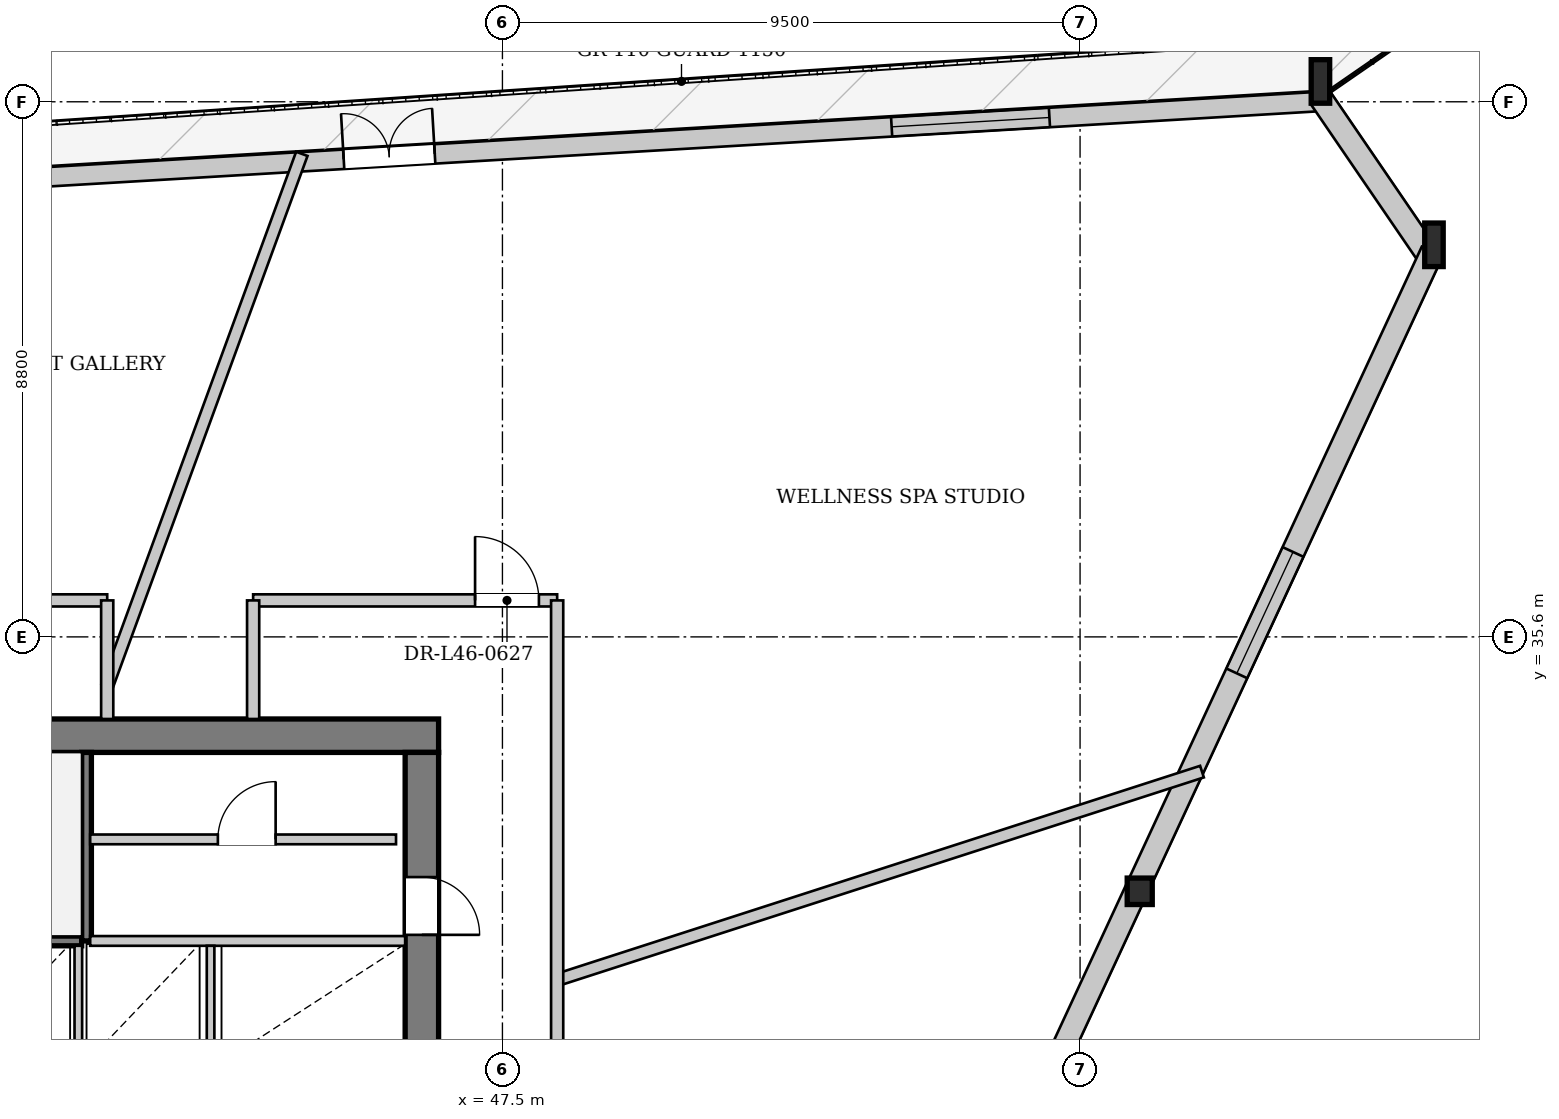
"""IFC4 building model, lengths in metres.
Left out: names, types, materials, properties, quantities, classifications, styles, units other than length and angle.
Written with IfcOpenShell. Run it as: python <this file> out.ifc"""

import sys

from ifc_helpers import new_model, si_unit, direction, frame, frame_2d, origin, origin_2d, place, context, subcontext, project, spatial, rectangle, i_section, extrude, source, transform, mapped, element, fill, save


model = new_model("IFC4")
c1 = context("Model", 3, precision=1e-05, world=origin(), true_north=direction((0.0, 1.0)))
c2 = subcontext(c1, "Body", "Model", "MODEL_VIEW")
j1 = project(units=[si_unit("LENGTHUNIT", "METRE"), si_unit("PLANEANGLEUNIT", "RADIAN")], contexts=[c1])
p1 = place(None, origin())
s1 = spatial("IfcSite", under=j1, at=p1, CompositionType="ELEMENT")
p2 = place(p1, origin())
s2 = spatial("IfcBuilding", under=s1, at=p2, CompositionType="ELEMENT")
p3 = place(p2, frame((0.0, 0.0, 175.0)))
s3 = spatial("IfcBuildingStorey", under=s2, at=p3, CompositionType="ELEMENT", Elevation=175.0)
m1 = source(origin(), c2, "Body", "SweptSolid", [
    extrude(i_section(OverallWidth=0.304, OverallDepth=0.716, WebThickness=0.021, FlangeThickness=0.04, at=origin_2d()), origin(), (0.0, 0.0, 1.0), 3.419),
])
p4 = place(p3, frame((62.965, 41.858, 0.0), z_axis=(-0.084770266096, 0.111194022166, 0.99017669707), x_axis=(-0.795255814538, -0.606274021745, 0.0)))
e1 = element("IfcColumn", 1, at=p4, inside=s3, PredefinedType="COLUMN", context=c2, shape_type="MappedRepresentation", body=[
    mapped(m1, transform((0.0, 0.0, 0.0), x_axis=(1.0, 0.0, 0.0), y_axis=(0.0, 1.0, 0.0), z_axis=(0.0, 0.0, 1.0), scale=1.0)),
])
m2 = source(origin(), c2, "Body", "SweptSolid", [
    extrude(i_section(OverallWidth=0.304, OverallDepth=0.716, WebThickness=0.021, FlangeThickness=0.04, at=origin_2d()), origin(), (0.0, 0.0, 1.0), 3.414),
])
p5 = place(p3, frame((61.108, 44.575, 0.0), z_axis=(-0.090815817795, 0.093533141477, 0.991465601362), x_axis=(-0.717451675524, -0.696608278223, 0.0)))
e2 = element("IfcColumn", 2, at=p5, inside=s3, PredefinedType="COLUMN", context=c2, shape_type="MappedRepresentation", body=[
    mapped(m2, transform((0.0, 0.0, 0.0), x_axis=(1.0, 0.0, 0.0), y_axis=(0.0, 1.0, 0.0), z_axis=(0.0, 0.0, 1.0), scale=1.0)),
])
m3 = source(origin(), c2, "Body", "SweptSolid", [
    extrude(i_section(OverallWidth=0.412, OverallDepth=0.435, WebThickness=0.031, FlangeThickness=0.05, at=origin_2d()), origin(), (0.0, 0.0, 1.0), 3.404),
])
p6 = place(p3, frame((58.05, 31.252, 0.0), z_axis=(-0.0404553248, 0.096332448948, 0.994526734671), x_axis=(-0.92199681109, -0.387197469438, 0.0)))
e3 = element("IfcColumn", 3, at=p6, inside=s3, PredefinedType="COLUMN", context=c2, shape_type="MappedRepresentation", body=[
    mapped(m3, transform((0.0, 0.0, 0.0), x_axis=(1.0, 0.0, 0.0), y_axis=(0.0, 1.0, 0.0), z_axis=(0.0, 0.0, 1.0), scale=1.0)),
])
p7 = place(p3, frame((38.354, 43.067, 0.0), z_axis=(0.0, 0.0, 1.0), x_axis=(0.998252151259, 0.059098582957, 0.0)))
e4 = element("IfcWall", 4, at=p7, inside=s3, PredefinedType="SOLIDWALL", context=c2, shape_type="SweptSolid", body=[
    extrude(rectangle(XDim=22.803, YDim=0.32, at=frame_2d((11.402, 0.0))), origin(), (0.0, 0.0, 1.0), 2.722),
])
p8 = place(p7, frame((6.547, 0.0, 0.0)))
e5 = element("IfcOpeningElement", 5, at=p8, cuts=e4, PredefinedType="OPENING", context=c2, shape_type="SweptSolid", body=[
    extrude(rectangle(XDim=1.5, YDim=2.3, at=frame_2d((0.75, 1.15))), frame((0.0, 0.17, 0.0), z_axis=(0.0, -1.0, 0.0), x_axis=(1.0, 0.0, 0.0)), (0.0, 0.0, 1.0), 0.34),
])
p9 = place(p7, frame((15.574, 0.0, 0.252)))
e6 = element("IfcOpeningElement", 6, at=p9, cuts=e4, PredefinedType="OPENING", context=c2, shape_type="SweptSolid", body=[
    extrude(rectangle(XDim=2.6, YDim=2.35, at=frame_2d((1.3, 1.175))), frame((0.0, 0.17, 0.0), z_axis=(0.0, -1.0, 0.0), x_axis=(1.0, 0.0, 0.0)), (0.0, 0.0, 1.0), 0.34),
])
p10 = place(p3, frame((60.951, 44.468, 0.0), z_axis=(0.0, 0.0, 1.0), x_axis=(0.564284906386, -0.825580125987, 0.0)))
e7 = element("IfcWall", 7, at=p10, inside=s3, PredefinedType="SOLIDWALL", context=c2, shape_type="SweptSolid", body=[
    extrude(rectangle(XDim=3.291, YDim=0.38, at=frame_2d((1.646, 0.0))), origin(), (0.0, 0.0, 1.0), 2.722),
])
p11 = place(p3, frame((62.792, 41.938, 0.0), z_axis=(0.0, 0.0, 1.0), x_axis=(-0.420482819505, -0.907300500662, 0.0)))
e8 = element("IfcWall", 8, at=p11, inside=s3, PredefinedType="SOLIDWALL", context=c2, shape_type="SweptSolid", body=[
    extrude(rectangle(XDim=23.378, YDim=0.38, at=frame_2d((11.689, 0.0))), origin(), (0.0, 0.0, 1.0), 2.722),
])
p12 = place(p11, frame((5.446, 0.0, 0.352)))
e9 = element("IfcOpeningElement", 9, at=p12, cuts=e8, PredefinedType="OPENING", context=c2, shape_type="SweptSolid", body=[
    extrude(rectangle(XDim=2.2, YDim=2.25, at=frame_2d((1.1, 1.125))), frame((0.0, 0.2, 0.0), z_axis=(0.0, -1.0, 0.0), x_axis=(1.0, 0.0, 0.0)), (0.0, 0.0, 1.0), 0.4),
])
p13 = place(p11, frame((15.732, 0.0, 0.352)))
e10 = element("IfcOpeningElement", 10, at=p13, cuts=e8, PredefinedType="OPENING", context=c2, shape_type="SweptSolid", body=[
    extrude(rectangle(XDim=2.2, YDim=2.25, at=frame_2d((1.1, 1.125))), frame((0.0, 0.2, 0.0), z_axis=(0.0, -1.0, 0.0), x_axis=(1.0, 0.0, 0.0)), (0.0, 0.0, 1.0), 0.4),
])
p14 = place(p3, frame((29.55, 33.975, 0.0), z_axis=(0.0, 0.0, 1.0), x_axis=(1.0, 0.0, 0.0)))
e11 = element("IfcWall", 11, at=p14, inside=s3, PredefinedType="SHEAR", context=c2, shape_type="SweptSolid", body=[
    extrude(rectangle(XDim=16.9, YDim=0.55, at=frame_2d((8.45, 0.0))), origin(), (0.0, 0.0, 1.0), 3.33),
])
p15 = place(p14, frame((1.55, 0.0, 0.0)))
e12 = element("IfcOpeningElement", 12, at=p15, cuts=e11, PredefinedType="OPENING", context=c2, shape_type="SweptSolid", body=[
    extrude(rectangle(XDim=0.95, YDim=2.1, at=frame_2d((0.475, 1.05))), frame((0.0, 0.285, 0.0), z_axis=(0.0, -1.0, 0.0), x_axis=(1.0, 0.0, 0.0)), (0.0, 0.0, 1.0), 0.57),
])
p16 = place(p14, frame((3.93, 0.0, 0.0)))
e13 = element("IfcOpeningElement", 13, at=p16, cuts=e11, PredefinedType="OPENING", context=c2, shape_type="SweptSolid", body=[
    extrude(rectangle(XDim=1.32, YDim=2.2, at=frame_2d((0.66, 1.1))), frame((0.0, 0.285, 0.0), z_axis=(0.0, -1.0, 0.0), x_axis=(1.0, 0.0, 0.0)), (0.0, 0.0, 1.0), 0.57),
])
p17 = place(p3, frame((46.175, 33.7, 0.0), z_axis=(0.0, 0.0, 1.0), x_axis=(0.0, -1.0, 0.0)))
e14 = element("IfcWall", 14, at=p17, inside=s3, PredefinedType="SHEAR", context=c2, shape_type="SweptSolid", body=[
    extrude(rectangle(XDim=14.2, YDim=0.55, at=frame_2d((7.1, 0.0))), origin(), (0.0, 0.0, 1.0), 3.33),
])
p18 = place(p17, frame((5.18, 0.0, 0.0)))
e15 = element("IfcOpeningElement", 15, at=p18, cuts=e14, PredefinedType="OPENING", context=c2, shape_type="SweptSolid", body=[
    extrude(rectangle(XDim=1.6, YDim=2.2, at=frame_2d((0.8, 1.1))), frame((0.0, 0.285, 0.0), z_axis=(0.0, -1.0, 0.0), x_axis=(1.0, 0.0, 0.0)), (0.0, 0.0, 1.0), 0.57),
])
p19 = place(p17, frame((2.05, 0.0, 0.0)))
e16 = element("IfcOpeningElement", 16, at=p19, cuts=e14, PredefinedType="OPENING", context=c2, shape_type="SweptSolid", body=[
    extrude(rectangle(XDim=0.95, YDim=2.1, at=frame_2d((0.475, 1.05))), frame((0.0, 0.285, 0.0), z_axis=(0.0, -1.0, 0.0), x_axis=(1.0, 0.0, 0.0)), (0.0, 0.0, 1.0), 0.57),
])
p20 = place(p3, frame((33.28, 30.6, 0.0), z_axis=(0.0, 0.0, 1.0), x_axis=(1.0, 0.0, 0.0)))
e17 = element("IfcWall", 17, at=p20, inside=s3, PredefinedType="PARTITIONING", context=c2, shape_type="SweptSolid", body=[
    extrude(rectangle(XDim=7.3, YDim=0.16, at=frame_2d((3.65, 0.0))), origin(), (0.0, 0.0, 1.0), 3.33),
])
p21 = place(p3, frame((40.66, 30.6, 0.0), z_axis=(0.0, 0.0, 1.0), x_axis=(0.0, 1.0, 0.0)))
e18 = element("IfcWall", 18, at=p21, inside=s3, PredefinedType="PARTITIONING", context=c2, shape_type="SweptSolid", body=[
    extrude(rectangle(XDim=3.1, YDim=0.16, at=frame_2d((1.55, 0.0))), origin(), (0.0, 0.0, 1.0), 3.33),
])
p22 = place(p3, frame((40.72, 30.6, 0.0), z_axis=(0.0, 0.0, 1.0), x_axis=(1.0, 0.0, 0.0)))
e19 = element("IfcWall", 19, at=p22, inside=s3, PredefinedType="PARTITIONING", context=c2, shape_type="SweptSolid", body=[
    extrude(rectangle(XDim=5.18, YDim=0.16, at=frame_2d((2.59, 0.0))), origin(), (0.0, 0.0, 1.0), 3.33),
])
for number, where, z_axis, x_axis in (
    (20, (40.525, 28.6, 0.0), (0.0, 0.0, 1.0), (0.0, 1.0, 0.0)),
    (21, (42.7, 28.6, 0.0), (0.0, 0.0, 1.0), (0.0, 1.0, 0.0)),
):
    element("IfcWall", number, at=place(p3, frame(where, z_axis=z_axis, x_axis=x_axis)), inside=s3, PredefinedType="PARTITIONING", context=c2, shape_type="SweptSolid", body=[
        extrude(rectangle(XDim=1.92, YDim=0.125, at=frame_2d((0.96, 0.0))), origin(), (0.0, 0.0, 1.0), 3.33),
    ])
p23 = place(p3, frame((40.72, 32.27, 0.0), z_axis=(0.0, 0.0, 1.0), x_axis=(1.0, 0.0, 0.0)))
e22 = element("IfcWall", 22, at=p23, inside=s3, PredefinedType="PARTITIONING", context=c2, shape_type="SweptSolid", body=[
    extrude(rectangle(XDim=5.03, YDim=0.16, at=frame_2d((2.515, 0.0))), origin(), (0.0, 0.0, 1.0), 3.33),
])
p24 = place(p23, frame((2.1, 0.0, 0.0)))
e23 = element("IfcOpeningElement", 23, at=p24, cuts=e22, PredefinedType="OPENING", context=c2, shape_type="SweptSolid", body=[
    extrude(rectangle(XDim=0.95, YDim=2.1, at=frame_2d((0.475, 1.05))), frame((0.0, 0.09, 0.0), z_axis=(0.0, -1.0, 0.0), x_axis=(1.0, 0.0, 0.0)), (0.0, 0.0, 1.0), 0.18),
])
p25 = place(p3, frame((48.4, 29.959, 0.0), z_axis=(0.0, 0.0, 1.0), x_axis=(0.951588584085, 0.307374635648, 0.0)))
e24 = element("IfcWall", 24, at=p25, inside=s3, PredefinedType="PARTITIONING", context=c2, shape_type="SweptSolid", body=[
    extrude(rectangle(XDim=11.145, YDim=0.2, at=frame_2d((5.572, 0.0))), origin(), (0.0, 0.0, 1.0), 3.33),
])
p26 = place(p3, frame((41.0, 34.798, 0.0), z_axis=(0.0, 0.0, 1.0), x_axis=(0.343651455117, 0.939097267271, 0.0)))
e25 = element("IfcWall", 25, at=p26, inside=s3, PredefinedType="PARTITIONING", context=c2, shape_type="SweptSolid", body=[
    extrude(rectangle(XDim=9.313, YDim=0.2, at=frame_2d((4.656, 0.0))), origin(), (0.0, 0.0, 1.0), 3.33),
])
p27 = place(p3, frame((27.6, 36.2, 0.0), z_axis=(0.0, 0.0, 1.0), x_axis=(1.0, 0.0, 0.0)))
e26 = element("IfcWall", 26, at=p27, inside=s3, PredefinedType="PARTITIONING", context=c2, shape_type="SweptSolid", body=[
    extrude(rectangle(XDim=13.4, YDim=0.2, at=frame_2d((6.7, 0.0))), origin(), (0.0, 0.0, 1.0), 3.33),
])
p28 = place(p27, frame((9.415, 0.0, 0.0)))
e27 = element("IfcOpeningElement", 27, at=p28, cuts=e26, PredefinedType="OPENING", context=c2, shape_type="SweptSolid", body=[
    extrude(rectangle(XDim=1.05, YDim=2.2, at=frame_2d((0.525, 1.1))), frame((0.0, 0.11, 0.0), z_axis=(0.0, -1.0, 0.0), x_axis=(1.0, 0.0, 0.0)), (0.0, 0.0, 1.0), 0.22),
])
p29 = place(p27, frame((1.929, 0.0, 0.0)))
e28 = element("IfcOpeningElement", 28, at=p29, cuts=e26, PredefinedType="OPENING", context=c2, shape_type="SweptSolid", body=[
    extrude(rectangle(XDim=1.05, YDim=2.2, at=frame_2d((0.525, 1.1))), frame((0.0, 0.11, 0.0), z_axis=(0.0, -1.0, 0.0), x_axis=(1.0, 0.0, 0.0)), (0.0, 0.0, 1.0), 0.22),
])
p30 = place(p3, frame((41.0, 34.25, 0.0), z_axis=(0.0, 0.0, 1.0), x_axis=(0.0, 1.0, 0.0)))
e29 = element("IfcWall", 29, at=p30, inside=s3, PredefinedType="PARTITIONING", context=c2, shape_type="SweptSolid", body=[
    extrude(rectangle(XDim=1.95, YDim=0.2, at=frame_2d((0.975, 0.0))), origin(), (0.0, 0.0, 1.0), 3.33),
])
p31 = place(p3, frame((43.4, 36.2, 0.0), z_axis=(0.0, 0.0, 1.0), x_axis=(1.0, 0.0, 0.0)))
e30 = element("IfcWall", 30, at=p31, inside=s3, PredefinedType="PARTITIONING", context=c2, shape_type="SweptSolid", body=[
    extrude(rectangle(XDim=5.0, YDim=0.2, at=frame_2d((2.5, 0.0))), origin(), (0.0, 0.0, 1.0), 3.33),
])
p32 = place(p31, frame((3.65, 0.0, 0.0)))
e31 = element("IfcOpeningElement", 31, at=p32, cuts=e30, PredefinedType="OPENING", context=c2, shape_type="SweptSolid", body=[
    extrude(rectangle(XDim=1.05, YDim=2.2, at=frame_2d((0.525, 1.1))), frame((0.0, 0.11, 0.0), z_axis=(0.0, -1.0, 0.0), x_axis=(1.0, 0.0, 0.0)), (0.0, 0.0, 1.0), 0.22),
])
p33 = place(p3, frame((43.4, 34.25, 0.0), z_axis=(0.0, 0.0, 1.0), x_axis=(0.0, 1.0, 0.0)))
e32 = element("IfcWall", 32, at=p33, inside=s3, PredefinedType="PARTITIONING", context=c2, shape_type="SweptSolid", body=[
    extrude(rectangle(XDim=1.95, YDim=0.2, at=frame_2d((0.975, 0.0))), origin(), (0.0, 0.0, 1.0), 3.33),
])
p34 = place(p3, frame((48.4, 17.0, 0.0), z_axis=(0.0, 0.0, 1.0), x_axis=(0.0, 1.0, 0.0)))
e33 = element("IfcWall", 33, at=p34, inside=s3, PredefinedType="PARTITIONING", context=c2, shape_type="SweptSolid", body=[
    extrude(rectangle(XDim=19.2, YDim=0.2, at=frame_2d((9.6, 0.0))), origin(), (0.0, 0.0, 1.0), 3.33),
])
p35 = place(p34, frame((8.849, 0.0, 0.0)))
e34 = element("IfcOpeningElement", 34, at=p35, cuts=e33, PredefinedType="OPENING", context=c2, shape_type="SweptSolid", body=[
    extrude(rectangle(XDim=1.05, YDim=2.2, at=frame_2d((0.525, 1.1))), frame((0.0, 0.11, 0.0), z_axis=(0.0, -1.0, 0.0), x_axis=(1.0, 0.0, 0.0)), (0.0, 0.0, 1.0), 0.22),
])
m4 = source(origin(), c2, "Body", "SweptSolid", [
    extrude(rectangle(XDim=1.5, YDim=2.3, at=frame_2d((0.75, 1.15))), frame((0.0, 0.025, 0.0), z_axis=(0.0, -1.0, 0.0), x_axis=(1.0, 0.0, 0.0)), (0.0, 0.0, 1.0), 0.05),
])
p36 = place(p8, origin())
e35 = element("IfcDoor", 35, at=p36, inside=s3, OperationType="DOUBLE_DOOR_SINGLE_SWING", PredefinedType="DOOR", context=c2, shape_type="MappedRepresentation", body=[
    mapped(m4, transform((0.0, 0.0, 0.0), x_axis=(1.0, 0.0, 0.0), y_axis=(0.0, 1.0, 0.0), z_axis=(0.0, 0.0, 1.0), scale=1.0)),
])
fill(e5, e35)
m5 = source(origin(), c2, "Body", "SweptSolid", [
    extrude(rectangle(XDim=2.6, YDim=2.35, at=frame_2d((1.3, 1.175))), frame((0.0, 0.03, 0.0), z_axis=(0.0, -1.0, 0.0), x_axis=(1.0, 0.0, 0.0)), (0.0, 0.0, 1.0), 0.06),
])
p37 = place(p9, origin())
e36 = element("IfcWindow", 36, at=p37, inside=s3, PartitioningType="SINGLE_PANEL", PredefinedType="WINDOW", context=c2, shape_type="MappedRepresentation", body=[
    mapped(m5, transform((0.0, 0.0, 0.0), x_axis=(1.0, 0.0, 0.0), y_axis=(0.0, 1.0, 0.0), z_axis=(0.0, 0.0, 1.0), scale=1.0)),
])
fill(e6, e36)
m6 = source(origin(), c2, "Body", "SweptSolid", [
    extrude(rectangle(XDim=2.2, YDim=2.25, at=frame_2d((1.1, 1.125))), frame((0.0, 0.03, 0.0), z_axis=(0.0, -1.0, 0.0), x_axis=(1.0, 0.0, 0.0)), (0.0, 0.0, 1.0), 0.06),
])
p38 = place(p12, origin())
e37 = element("IfcWindow", 37, at=p38, inside=s3, PartitioningType="SINGLE_PANEL", PredefinedType="WINDOW", context=c2, shape_type="MappedRepresentation", body=[
    mapped(m6, transform((0.0, 0.0, 0.0), x_axis=(1.0, 0.0, 0.0), y_axis=(0.0, 1.0, 0.0), z_axis=(0.0, 0.0, 1.0), scale=1.0)),
])
fill(e9, e37)
m7 = source(origin(), c2, "Body", "SweptSolid", [
    extrude(rectangle(XDim=0.95, YDim=2.1, at=frame_2d((0.475, 1.05))), frame((0.0, 0.025, 0.0), z_axis=(0.0, -1.0, 0.0), x_axis=(1.0, 0.0, 0.0)), (0.0, 0.0, 1.0), 0.05),
])
p39 = place(p24, origin())
e38 = element("IfcDoor", 38, at=p39, inside=s3, OperationType="SINGLE_SWING_RIGHT", PredefinedType="DOOR", context=c2, shape_type="MappedRepresentation", body=[
    mapped(m7, transform((0.0, 0.0, 0.0), x_axis=(1.0, 0.0, 0.0), y_axis=(0.0, 1.0, 0.0), z_axis=(0.0, 0.0, 1.0), scale=1.0)),
])
fill(e23, e38)
p40 = place(p19, origin())
e39 = element("IfcDoor", 39, at=p40, inside=s3, OperationType="SINGLE_SWING_RIGHT", PredefinedType="DOOR", context=c2, shape_type="MappedRepresentation", body=[
    mapped(m7, transform((0.0, 0.0, 0.0), x_axis=(1.0, 0.0, 0.0), y_axis=(0.0, 1.0, 0.0), z_axis=(0.0, 0.0, 1.0), scale=1.0)),
])
fill(e16, e39)
m8 = source(origin(), c2, "Body", "SweptSolid", [
    extrude(rectangle(XDim=1.05, YDim=2.2, at=frame_2d((0.525, 1.1))), frame((0.0, 0.025, 0.0), z_axis=(0.0, -1.0, 0.0), x_axis=(1.0, 0.0, 0.0)), (0.0, 0.0, 1.0), 0.05),
])
p41 = place(p32, origin())
e40 = element("IfcDoor", 40, at=p41, inside=s3, OperationType="SINGLE_SWING_LEFT", PredefinedType="DOOR", context=c2, shape_type="MappedRepresentation", body=[
    mapped(m8, transform((0.0, 0.0, 0.0), x_axis=(1.0, 0.0, 0.0), y_axis=(0.0, 1.0, 0.0), z_axis=(0.0, 0.0, 1.0), scale=1.0)),
])
fill(e31, e40)
save(model, sys.argv[1])
